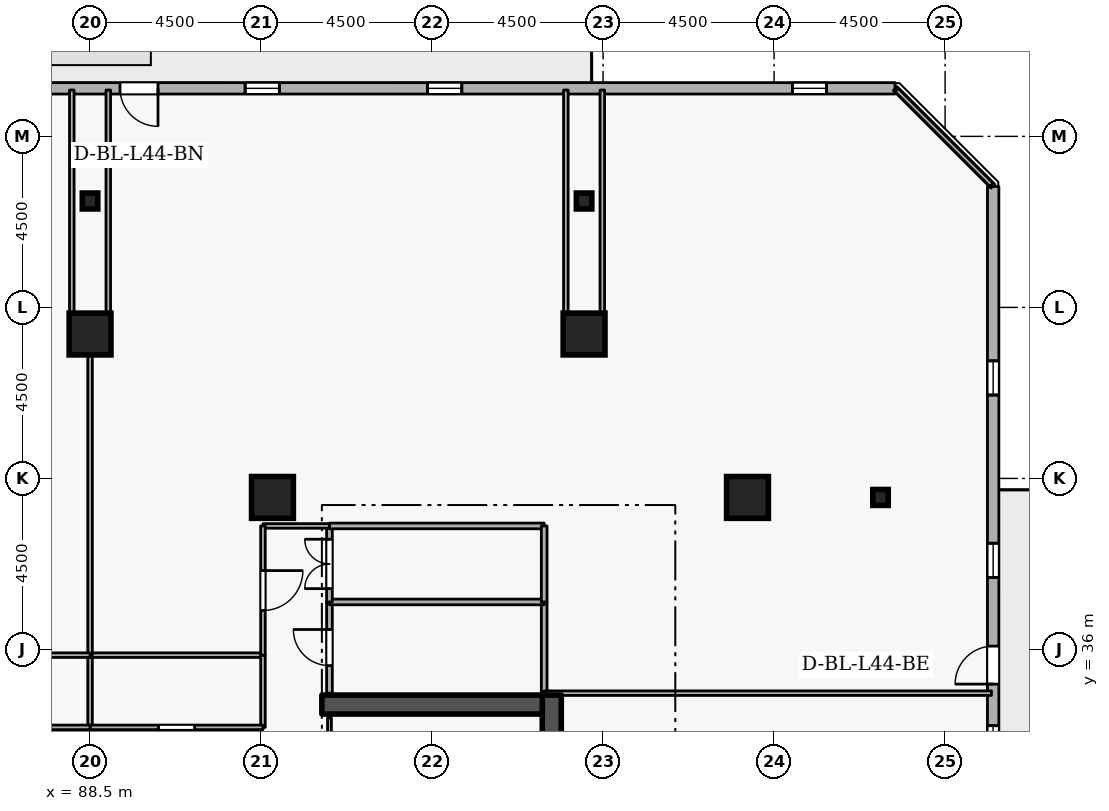
"""IFC4 building model, lengths in metres.
Left out: names, types, materials, properties, quantities, classifications, styles, units other than length and angle.
Written with IfcOpenShell. Run it as: python <this file> out.ifc"""

import sys

from ifc_helpers import new_model, si_unit, direction, frame, frame_2d, origin, origin_2d, place, context, subcontext, project, spatial, rectangle, i_section, extrude, element, fill, save


model = new_model("IFC4")
c1 = context("Model", 3, precision=1e-05, world=origin(), true_north=direction((0.0, 1.0)))
c2 = subcontext(c1, "Body", "Model", "MODEL_VIEW")
j1 = project(units=[si_unit("LENGTHUNIT", "METRE"), si_unit("PLANEANGLEUNIT", "RADIAN")], contexts=[c1])
p1 = place(None, origin())
s1 = spatial("IfcSite", under=j1, at=p1, CompositionType="ELEMENT")
p2 = place(p1, origin())
s2 = spatial("IfcBuilding", under=s1, at=p2, CompositionType="ELEMENT")
p3 = place(p2, frame((0.0, 0.0, 167.1)))
s3 = spatial("IfcBuildingStorey", under=s2, at=p3, CompositionType="ELEMENT", Elevation=167.1)
p4 = place(p3, frame((100.65, 19.2, 0.0), z_axis=(0.0, 0.0, 1.0), x_axis=(0.0, 1.0, 0.0)))
e1 = element("IfcWall", 1, at=p4, inside=s3, PredefinedType="SHEAR", context=c2, shape_type="SweptSolid", body=[
    extrude(rectangle(XDim=15.6, YDim=0.5, at=frame_2d((7.8, 0.0))), origin(), (0.0, 0.0, 1.0), 3.6),
])
p5 = place(p3, frame((94.6, 34.55, 0.0), z_axis=(0.0, 0.0, 1.0), x_axis=(1.0, 0.0, 0.0)))
e2 = element("IfcWall", 2, at=p5, inside=s3, PredefinedType="SHEAR", context=c2, shape_type="SweptSolid", body=[
    extrude(rectangle(XDim=5.8, YDim=0.5, at=frame_2d((2.9, 0.0))), origin(), (0.0, 0.0, 1.0), 3.6),
])
for number, where, z_axis, x_axis in (
    (3, (105.8, 40.0, 0.0), (0.0, 0.0, 1.0), (1.0, 0.0, 0.0)),
    (4, (101.5, 44.3, 0.0), (0.0, 0.0, 1.0), (1.0, 0.0, 0.0)),
    (5, (88.5, 44.3, 0.0), (0.0, 0.0, 1.0), (1.0, 0.0, 0.0)),
    (6, (93.3, 40.0, 0.0), (0.0, 0.0, 1.0), (1.0, 0.0, 0.0)),
):
    element("IfcColumn", number, at=place(p3, frame(where, z_axis=z_axis, x_axis=x_axis)), inside=s3, PredefinedType="COLUMN", context=c2, shape_type="SweptSolid", body=[
        extrude(rectangle(XDim=1.1, YDim=1.1, at=origin_2d()), origin(), (0.0, 0.0, 1.0), 3.6),
    ])
for number, where, z_axis, x_axis in (
    (7, (109.3, 40.0, 0.0), (0.0, 0.0, 1.0), (1.0, 0.0, 0.0)),
    (8, (101.5, 47.8, 0.0), (0.0, 0.0, 1.0), (1.0, 0.0, 0.0)),
    (9, (88.5, 47.8, 0.0), (0.0, 0.0, 1.0), (1.0, 0.0, 0.0)),
):
    element("IfcColumn", number, at=place(p3, frame(where, z_axis=z_axis, x_axis=x_axis)), inside=s3, PredefinedType="COLUMN", context=c2, shape_type="SweptSolid", body=[
        extrude(i_section(OverallWidth=0.407, OverallDepth=0.419, WebThickness=0.031, FlangeThickness=0.049, FilletRadius=0.015, at=origin_2d()), origin(), (0.0, 0.0, 1.0), 3.6),
    ])
p6 = place(p3, frame((112.264, 12.094, 0.0), z_axis=(0.0, 0.0, 1.0), x_axis=(2.7061402e-05, 0.999999999634, 0.0)))
e10 = element("IfcWall", 10, at=p6, inside=s3, PredefinedType="STANDARD", context=c2, shape_type="SweptSolid", body=[
    extrude(rectangle(XDim=36.087, YDim=0.3, at=frame_2d((18.043, 0.0))), origin(), (0.0, 0.0, 1.0), 2.7),
])
p7 = place(p6, frame((22.993, 0.0, 0.0)))
e11 = element("IfcOpeningElement", 11, at=p7, cuts=e10, PredefinedType="OPENING", context=c2, shape_type="SweptSolid", body=[
    extrude(rectangle(XDim=1.0, YDim=2.08, at=frame_2d((0.5, 1.04))), frame((0.0, 0.16, 0.0), z_axis=(0.0, -1.0, 0.0), x_axis=(1.0, 0.0, 0.0)), (0.0, 0.0, 1.0), 0.32),
])
p8 = place(p6, frame((1.8, 0.0, 0.72)))
e12 = element("IfcOpeningElement", 12, at=p8, cuts=e10, PredefinedType="OPENING", context=c2, shape_type="SweptSolid", body=[
    extrude(rectangle(XDim=0.9, YDim=1.75, at=frame_2d((0.45, 0.875))), frame((0.0, 0.16, 0.0), z_axis=(0.0, -1.0, 0.0), x_axis=(1.0, 0.0, 0.0)), (0.0, 0.0, 1.0), 0.32),
])
p9 = place(p6, frame((6.6, 0.0, 0.72)))
e13 = element("IfcOpeningElement", 13, at=p9, cuts=e10, PredefinedType="OPENING", context=c2, shape_type="SweptSolid", body=[
    extrude(rectangle(XDim=0.9, YDim=1.75, at=frame_2d((0.45, 0.875))), frame((0.0, 0.16, 0.0), z_axis=(0.0, -1.0, 0.0), x_axis=(1.0, 0.0, 0.0)), (0.0, 0.0, 1.0), 0.32),
])
p10 = place(p6, frame((11.4, 0.0, 0.72)))
e14 = element("IfcOpeningElement", 14, at=p10, cuts=e10, PredefinedType="OPENING", context=c2, shape_type="SweptSolid", body=[
    extrude(rectangle(XDim=0.9, YDim=1.75, at=frame_2d((0.45, 0.875))), frame((0.0, 0.16, 0.0), z_axis=(0.0, -1.0, 0.0), x_axis=(1.0, 0.0, 0.0)), (0.0, 0.0, 1.0), 0.32),
])
p11 = place(p6, frame((16.2, 0.0, 0.72)))
e15 = element("IfcOpeningElement", 15, at=p11, cuts=e10, PredefinedType="OPENING", context=c2, shape_type="SweptSolid", body=[
    extrude(rectangle(XDim=0.9, YDim=1.75, at=frame_2d((0.45, 0.875))), frame((0.0, 0.16, 0.0), z_axis=(0.0, -1.0, 0.0), x_axis=(1.0, 0.0, 0.0)), (0.0, 0.0, 1.0), 0.32),
])
p12 = place(p6, frame((21.0, 0.0, 0.72)))
e16 = element("IfcOpeningElement", 16, at=p12, cuts=e10, PredefinedType="OPENING", context=c2, shape_type="SweptSolid", body=[
    extrude(rectangle(XDim=0.9, YDim=1.75, at=frame_2d((0.45, 0.875))), frame((0.0, 0.16, 0.0), z_axis=(0.0, -1.0, 0.0), x_axis=(1.0, 0.0, 0.0)), (0.0, 0.0, 1.0), 0.32),
])
p13 = place(p6, frame((25.8, 0.0, 0.72)))
e17 = element("IfcOpeningElement", 17, at=p13, cuts=e10, PredefinedType="OPENING", context=c2, shape_type="SweptSolid", body=[
    extrude(rectangle(XDim=0.9, YDim=1.75, at=frame_2d((0.45, 0.875))), frame((0.0, 0.16, 0.0), z_axis=(0.0, -1.0, 0.0), x_axis=(1.0, 0.0, 0.0)), (0.0, 0.0, 1.0), 0.32),
])
p14 = place(p6, frame((30.6, 0.0, 0.72)))
e18 = element("IfcOpeningElement", 18, at=p14, cuts=e10, PredefinedType="OPENING", context=c2, shape_type="SweptSolid", body=[
    extrude(rectangle(XDim=0.9, YDim=1.75, at=frame_2d((0.45, 0.875))), frame((0.0, 0.16, 0.0), z_axis=(0.0, -1.0, 0.0), x_axis=(1.0, 0.0, 0.0)), (0.0, 0.0, 1.0), 0.32),
])
p15 = place(p3, frame((109.681, 50.765, 0.0), z_axis=(0.0, 0.0, 1.0), x_axis=(-0.999999999634, -2.7061402e-05, 0.0)))
e19 = element("IfcWall", 19, at=p15, inside=s3, PredefinedType="STANDARD", context=c2, shape_type="SweptSolid", body=[
    extrude(rectangle(XDim=36.087, YDim=0.3, at=frame_2d((18.043, 0.0))), origin(), (0.0, 0.0, 1.0), 2.7),
])
p16 = place(p15, frame((19.393, 0.0, 0.0)))
e20 = element("IfcOpeningElement", 20, at=p16, cuts=e19, PredefinedType="OPENING", context=c2, shape_type="SweptSolid", body=[
    extrude(rectangle(XDim=1.0, YDim=2.08, at=frame_2d((0.5, 1.04))), frame((0.0, 0.16, 0.0), z_axis=(0.0, -1.0, 0.0), x_axis=(1.0, 0.0, 0.0)), (0.0, 0.0, 1.0), 0.32),
])
p17 = place(p15, frame((1.8, 0.0, 0.72)))
e21 = element("IfcOpeningElement", 21, at=p17, cuts=e19, PredefinedType="OPENING", context=c2, shape_type="SweptSolid", body=[
    extrude(rectangle(XDim=0.9, YDim=1.75, at=frame_2d((0.45, 0.875))), frame((0.0, 0.16, 0.0), z_axis=(0.0, -1.0, 0.0), x_axis=(1.0, 0.0, 0.0)), (0.0, 0.0, 1.0), 0.32),
])
p18 = place(p15, frame((11.4, 0.0, 0.72)))
e22 = element("IfcOpeningElement", 22, at=p18, cuts=e19, PredefinedType="OPENING", context=c2, shape_type="SweptSolid", body=[
    extrude(rectangle(XDim=0.9, YDim=1.75, at=frame_2d((0.45, 0.875))), frame((0.0, 0.16, 0.0), z_axis=(0.0, -1.0, 0.0), x_axis=(1.0, 0.0, 0.0)), (0.0, 0.0, 1.0), 0.32),
])
p19 = place(p15, frame((16.2, 0.0, 0.72)))
e23 = element("IfcOpeningElement", 23, at=p19, cuts=e19, PredefinedType="OPENING", context=c2, shape_type="SweptSolid", body=[
    extrude(rectangle(XDim=0.9, YDim=1.75, at=frame_2d((0.45, 0.875))), frame((0.0, 0.16, 0.0), z_axis=(0.0, -1.0, 0.0), x_axis=(1.0, 0.0, 0.0)), (0.0, 0.0, 1.0), 0.32),
])
p20 = place(p15, frame((25.8, 0.0, 0.72)))
e24 = element("IfcOpeningElement", 24, at=p20, cuts=e19, PredefinedType="OPENING", context=c2, shape_type="SweptSolid", body=[
    extrude(rectangle(XDim=0.9, YDim=1.75, at=frame_2d((0.45, 0.875))), frame((0.0, 0.16, 0.0), z_axis=(0.0, -1.0, 0.0), x_axis=(1.0, 0.0, 0.0)), (0.0, 0.0, 1.0), 0.32),
])
p21 = place(p15, frame((30.6, 0.0, 0.72)))
e25 = element("IfcOpeningElement", 25, at=p21, cuts=e19, PredefinedType="OPENING", context=c2, shape_type="SweptSolid", body=[
    extrude(rectangle(XDim=0.9, YDim=1.75, at=frame_2d((0.45, 0.875))), frame((0.0, 0.16, 0.0), z_axis=(0.0, -1.0, 0.0), x_axis=(1.0, 0.0, 0.0)), (0.0, 0.0, 1.0), 0.32),
])
p22 = place(p3, frame((94.8, 32.05, 0.0), z_axis=(0.0, 0.0, 1.0), x_axis=(0.0, 1.0, 0.0)))
e26 = element("IfcWall", 26, at=p22, inside=s3, PredefinedType="PARTITIONING", context=c2, shape_type="SweptSolid", body=[
    extrude(rectangle(XDim=2.15, YDim=0.1, at=frame_2d((1.075, 0.0))), origin(), (0.0, 0.0, 1.0), 3.34),
])
p23 = place(p22, frame((0.6, 0.0, 0.0)))
e27 = element("IfcOpeningElement", 27, at=p23, cuts=e26, PredefinedType="OPENING", context=c2, shape_type="SweptSolid", body=[
    extrude(rectangle(XDim=0.95, YDim=2.1, at=frame_2d((0.475, 1.05))), frame((0.0, 0.06, 0.0), z_axis=(0.0, -1.0, 0.0), x_axis=(1.0, 0.0, 0.0)), (0.0, 0.0, 1.0), 0.12),
])
p24 = place(p3, frame((100.45, 37.25, 0.0), z_axis=(0.0, 0.0, 1.0), x_axis=(0.0, -1.0, 0.0)))
e28 = element("IfcWall", 28, at=p24, inside=s3, PredefinedType="PARTITIONING", context=c2, shape_type="SweptSolid", body=[
    extrude(rectangle(XDim=2.4, YDim=0.15, at=frame_2d((1.2, 0.0))), origin(), (0.0, 0.0, 1.0), 3.34),
])
p25 = place(p3, frame((94.8, 34.85, 0.0), z_axis=(0.0, 0.0, 1.0), x_axis=(0.0, 1.0, 0.0)))
e29 = element("IfcWall", 29, at=p25, inside=s3, PredefinedType="PARTITIONING", context=c2, shape_type="SweptSolid", body=[
    extrude(rectangle(XDim=2.4, YDim=0.15, at=frame_2d((1.2, 0.0))), origin(), (0.0, 0.0, 1.0), 3.34),
])
p26 = place(p25, frame((0.725, 0.0, 0.0)))
e30 = element("IfcOpeningElement", 30, at=p26, cuts=e29, PredefinedType="OPENING", context=c2, shape_type="SweptSolid", body=[
    extrude(rectangle(XDim=0.95, YDim=2.1, at=frame_2d((0.475, 1.05))), frame((0.0, 0.085, 0.0), z_axis=(0.0, -1.0, 0.0), x_axis=(1.0, 0.0, 0.0)), (0.0, 0.0, 1.0), 0.17),
])
p27 = place(p3, frame((94.8, 37.25, 0.0), z_axis=(0.0, 0.0, 1.0), x_axis=(1.0, 0.0, 0.0)))
e31 = element("IfcWall", 31, at=p27, inside=s3, PredefinedType="PARTITIONING", context=c2, shape_type="SweptSolid", body=[
    extrude(rectangle(XDim=5.65, YDim=0.15, at=frame_2d((2.825, 0.0))), origin(), (0.0, 0.0, 1.0), 3.34),
])
p28 = place(p3, frame((94.8, 37.25, 0.0), z_axis=(0.0, 0.0, 1.0), x_axis=(0.0, 1.0, 0.0)))
e32 = element("IfcWall", 32, at=p28, inside=s3, PredefinedType="PARTITIONING", context=c2, shape_type="SweptSolid", body=[
    extrude(rectangle(XDim=2.0, YDim=0.15, at=frame_2d((1.0, 0.0))), origin(), (0.0, 0.0, 1.0), 3.34),
])
p29 = place(p28, frame((0.35, 0.0, 0.0)))
e33 = element("IfcOpeningElement", 33, at=p29, cuts=e32, PredefinedType="OPENING", context=c2, shape_type="SweptSolid", body=[
    extrude(rectangle(XDim=1.3, YDim=2.12, at=frame_2d((0.65, 1.06))), frame((0.0, 0.085, 0.0), z_axis=(0.0, -1.0, 0.0), x_axis=(1.0, 0.0, 0.0)), (0.0, 0.0, 1.0), 0.17),
])
p30 = place(p3, frame((94.8, 39.25, 0.0), z_axis=(0.0, 0.0, 1.0), x_axis=(1.0, 0.0, 0.0)))
e34 = element("IfcWall", 34, at=p30, inside=s3, PredefinedType="PARTITIONING", context=c2, shape_type="SweptSolid", body=[
    extrude(rectangle(XDim=5.65, YDim=0.15, at=frame_2d((2.825, 0.0))), origin(), (0.0, 0.0, 1.0), 3.34),
])
p31 = place(p3, frame((100.45, 39.25, 0.0), z_axis=(0.0, 0.0, 1.0), x_axis=(0.0, -1.0, 0.0)))
e35 = element("IfcWall", 35, at=p31, inside=s3, PredefinedType="PARTITIONING", context=c2, shape_type="SweptSolid", body=[
    extrude(rectangle(XDim=2.0, YDim=0.15, at=frame_2d((1.0, 0.0))), origin(), (0.0, 0.0, 1.0), 3.34),
])
p32 = place(p3, frame((88.5, 33.95, 0.0), z_axis=(0.0, 0.0, 1.0), x_axis=(0.0, 1.0, 0.0)))
e36 = element("IfcWall", 36, at=p32, inside=s3, PredefinedType="PARTITIONING", context=c2, shape_type="SweptSolid", body=[
    extrude(rectangle(XDim=1.9, YDim=0.12, at=frame_2d((0.95, 0.0))), origin(), (0.0, 0.0, 1.0), 3.34),
])
p33 = place(p3, frame((88.5, 35.85, 0.0), z_axis=(0.0, 0.0, 1.0), x_axis=(1.0, 0.0, 0.0)))
e37 = element("IfcWall", 37, at=p33, inside=s3, PredefinedType="PARTITIONING", context=c2, shape_type="SweptSolid", body=[
    extrude(rectangle(XDim=4.55, YDim=0.12, at=frame_2d((2.275, 0.0))), origin(), (0.0, 0.0, 1.0), 3.34),
])
p34 = place(p3, frame((93.05, 35.85, 0.0), z_axis=(0.0, 0.0, 1.0), x_axis=(0.0, -1.0, 0.0)))
e38 = element("IfcWall", 38, at=p34, inside=s3, PredefinedType="PARTITIONING", context=c2, shape_type="SweptSolid", body=[
    extrude(rectangle(XDim=1.9, YDim=0.12, at=frame_2d((0.95, 0.0))), origin(), (0.0, 0.0, 1.0), 3.34),
])
p35 = place(p3, frame((93.05, 33.95, 0.0), z_axis=(0.0, 0.0, 1.0), x_axis=(-1.0, 0.0, 0.0)))
e39 = element("IfcWall", 39, at=p35, inside=s3, PredefinedType="PARTITIONING", context=c2, shape_type="SweptSolid", body=[
    extrude(rectangle(XDim=4.55, YDim=0.12, at=frame_2d((2.275, 0.0))), origin(), (0.0, 0.0, 1.0), 3.34),
])
p36 = place(p35, frame((1.8, 0.0, 0.0)))
e40 = element("IfcOpeningElement", 40, at=p36, cuts=e39, PredefinedType="OPENING", context=c2, shape_type="SweptSolid", body=[
    extrude(rectangle(XDim=0.95, YDim=2.1, at=frame_2d((0.475, 1.05))), frame((0.0, 0.07, 0.0), z_axis=(0.0, -1.0, 0.0), x_axis=(1.0, 0.0, 0.0)), (0.0, 0.0, 1.0), 0.14),
])
p37 = place(p3, frame((94.8, 39.25, 0.0), z_axis=(0.0, 0.0, 1.0), x_axis=(-1.0, 0.0, 0.0)))
e41 = element("IfcWall", 41, at=p37, inside=s3, PredefinedType="PARTITIONING", context=c2, shape_type="SweptSolid", body=[
    extrude(rectangle(XDim=1.75, YDim=0.12, at=frame_2d((0.875, 0.0))), origin(), (0.0, 0.0, 1.0), 3.34),
])
p38 = place(p3, frame((93.05, 39.25, 0.0), z_axis=(0.0, 0.0, 1.0), x_axis=(0.0, -1.0, 0.0)))
e42 = element("IfcWall", 42, at=p38, inside=s3, PredefinedType="PARTITIONING", context=c2, shape_type="SweptSolid", body=[
    extrude(rectangle(XDim=3.4, YDim=0.12, at=frame_2d((1.7, 0.0))), origin(), (0.0, 0.0, 1.0), 3.34),
])
p39 = place(p38, frame((1.175, 0.0, 0.0)))
e43 = element("IfcOpeningElement", 43, at=p39, cuts=e42, PredefinedType="OPENING", context=c2, shape_type="SweptSolid", body=[
    extrude(rectangle(XDim=1.05, YDim=2.1, at=frame_2d((0.525, 1.05))), frame((0.0, 0.07, 0.0), z_axis=(0.0, -1.0, 0.0), x_axis=(1.0, 0.0, 0.0)), (0.0, 0.0, 1.0), 0.14),
])
p40 = place(p3, frame((88.5, 35.85, 0.0), z_axis=(0.0, 0.0, 1.0), x_axis=(0.0, 1.0, 0.0)))
e44 = element("IfcWall", 44, at=p40, inside=s3, PredefinedType="PARTITIONING", context=c2, shape_type="SweptSolid", body=[
    extrude(rectangle(XDim=8.45, YDim=0.12, at=frame_2d((4.225, 0.0))), origin(), (0.0, 0.0, 1.0), 2.882),
])
for number, where, z_axis, x_axis in (
    (45, (88.98, 44.3, 0.0), (0.0, 0.0, 1.0), (0.0, 1.0, 0.0)),
    (46, (101.02, 50.72, 0.0), (0.0, 0.0, 1.0), (0.0, -1.0, 0.0)),
    (47, (101.98, 44.3, 0.0), (0.0, 0.0, 1.0), (0.0, 1.0, 0.0)),
):
    element("IfcWall", number, at=place(p3, frame(where, z_axis=z_axis, x_axis=x_axis)), inside=s3, PredefinedType="PARTITIONING", context=c2, shape_type="SweptSolid", body=[
        extrude(rectangle(XDim=6.42, YDim=0.12, at=frame_2d((3.21, 0.0))), origin(), (0.0, 0.0, 1.0), 3.34),
    ])
p41 = place(p3, frame((109.725, 50.72, 0.0), z_axis=(0.0, 0.0, 1.0), x_axis=(0.707106781187, -0.707106781187, 0.0)))
e48 = element("IfcWall", 48, at=p41, inside=s3, PredefinedType="PARTITIONING", context=c2, shape_type="SweptSolid", body=[
    extrude(rectangle(XDim=3.528, YDim=0.12, at=frame_2d((1.764, 0.0))), origin(), (0.0, 0.0, 1.0), 3.34),
])
p42 = place(p3, frame((112.22, 34.85, 0.0), z_axis=(0.0, 0.0, 1.0), x_axis=(-1.0, 0.0, 0.0)))
e49 = element("IfcWall", 49, at=p42, inside=s3, PredefinedType="PARTITIONING", context=c2, shape_type="SweptSolid", body=[
    extrude(rectangle(XDim=11.77, YDim=0.12, at=frame_2d((5.885, 0.0))), origin(), (0.0, 0.0, 1.0), 2.545),
])
p43 = place(p3, frame((83.95, 35.85, 0.0), z_axis=(0.0, 0.0, 1.0), x_axis=(1.0, 0.0, 0.0)))
e50 = element("IfcWall", 50, at=p43, inside=s3, PredefinedType="PARTITIONING", context=c2, shape_type="SweptSolid", body=[
    extrude(rectangle(XDim=4.55, YDim=0.12, at=frame_2d((2.275, 0.0))), origin(), (0.0, 0.0, 1.0), 3.34),
])
p44 = place(p3, frame((88.5, 33.95, 0.0), z_axis=(0.0, 0.0, 1.0), x_axis=(-1.0, 0.0, 0.0)))
e51 = element("IfcWall", 51, at=p44, inside=s3, PredefinedType="PARTITIONING", context=c2, shape_type="SweptSolid", body=[
    extrude(rectangle(XDim=4.55, YDim=0.12, at=frame_2d((2.275, 0.0))), origin(), (0.0, 0.0, 1.0), 3.34),
])
p45 = place(p44, frame((1.8, 0.0, 0.0)))
e52 = element("IfcOpeningElement", 52, at=p45, cuts=e51, PredefinedType="OPENING", context=c2, shape_type="SweptSolid", body=[
    extrude(rectangle(XDim=0.95, YDim=2.1, at=frame_2d((0.475, 1.05))), frame((0.0, 0.07, 0.0), z_axis=(0.0, -1.0, 0.0), x_axis=(1.0, 0.0, 0.0)), (0.0, 0.0, 1.0), 0.14),
])
p46 = place(p3, frame((88.02, 50.72, 0.0), z_axis=(0.0, 0.0, 1.0), x_axis=(0.0, -1.0, 0.0)))
e53 = element("IfcWall", 53, at=p46, inside=s3, PredefinedType="PARTITIONING", context=c2, shape_type="SweptSolid", body=[
    extrude(rectangle(XDim=6.42, YDim=0.12, at=frame_2d((3.21, 0.0))), origin(), (0.0, 0.0, 1.0), 3.34),
])
p47 = place(p7, origin())
e54 = element("IfcDoor", 54, at=p47, inside=s3, OperationType="SINGLE_SWING_LEFT", PredefinedType="DOOR", context=c2, shape_type="SweptSolid", body=[
    extrude(rectangle(XDim=1.0, YDim=2.08, at=frame_2d((0.5, 1.04))), frame((0.0, 0.025, 0.0), z_axis=(0.0, -1.0, 0.0), x_axis=(1.0, 0.0, 0.0)), (0.0, 0.0, 1.0), 0.05),
])
fill(e11, e54)
p48 = place(p12, origin())
e55 = element("IfcWindow", 55, at=p48, inside=s3, PartitioningType="SINGLE_PANEL", PredefinedType="WINDOW", context=c2, shape_type="SweptSolid", body=[
    extrude(rectangle(XDim=0.9, YDim=1.75, at=frame_2d((0.45, 0.875))), frame((0.0, 0.03, 0.0), z_axis=(0.0, -1.0, 0.0), x_axis=(1.0, 0.0, 0.0)), (0.0, 0.0, 1.0), 0.06),
])
fill(e16, e55)
p49 = place(p13, origin())
e56 = element("IfcWindow", 56, at=p49, inside=s3, PartitioningType="SINGLE_PANEL", PredefinedType="WINDOW", context=c2, shape_type="SweptSolid", body=[
    extrude(rectangle(XDim=0.9, YDim=1.75, at=frame_2d((0.45, 0.875))), frame((0.0, 0.03, 0.0), z_axis=(0.0, -1.0, 0.0), x_axis=(1.0, 0.0, 0.0)), (0.0, 0.0, 1.0), 0.06),
])
fill(e17, e56)
p50 = place(p14, origin())
e57 = element("IfcWindow", 57, at=p50, inside=s3, PartitioningType="SINGLE_PANEL", PredefinedType="WINDOW", context=c2, shape_type="SweptSolid", body=[
    extrude(rectangle(XDim=0.9, YDim=1.75, at=frame_2d((0.45, 0.875))), frame((0.0, 0.03, 0.0), z_axis=(0.0, -1.0, 0.0), x_axis=(1.0, 0.0, 0.0)), (0.0, 0.0, 1.0), 0.06),
])
fill(e18, e57)
p51 = place(p16, origin())
e58 = element("IfcDoor", 58, at=p51, inside=s3, OperationType="SINGLE_SWING_LEFT", PredefinedType="DOOR", context=c2, shape_type="SweptSolid", body=[
    extrude(rectangle(XDim=1.0, YDim=2.08, at=frame_2d((0.5, 1.04))), frame((0.0, 0.025, 0.0), z_axis=(0.0, -1.0, 0.0), x_axis=(1.0, 0.0, 0.0)), (0.0, 0.0, 1.0), 0.05),
])
fill(e20, e58)
p52 = place(p17, origin())
e59 = element("IfcWindow", 59, at=p52, inside=s3, PartitioningType="SINGLE_PANEL", PredefinedType="WINDOW", context=c2, shape_type="SweptSolid", body=[
    extrude(rectangle(XDim=0.9, YDim=1.75, at=frame_2d((0.45, 0.875))), frame((0.0, 0.03, 0.0), z_axis=(0.0, -1.0, 0.0), x_axis=(1.0, 0.0, 0.0)), (0.0, 0.0, 1.0), 0.06),
])
fill(e21, e59)
p53 = place(p18, origin())
e60 = element("IfcWindow", 60, at=p53, inside=s3, PartitioningType="SINGLE_PANEL", PredefinedType="WINDOW", context=c2, shape_type="SweptSolid", body=[
    extrude(rectangle(XDim=0.9, YDim=1.75, at=frame_2d((0.45, 0.875))), frame((0.0, 0.03, 0.0), z_axis=(0.0, -1.0, 0.0), x_axis=(1.0, 0.0, 0.0)), (0.0, 0.0, 1.0), 0.06),
])
fill(e22, e60)
p54 = place(p19, origin())
e61 = element("IfcWindow", 61, at=p54, inside=s3, PartitioningType="SINGLE_PANEL", PredefinedType="WINDOW", context=c2, shape_type="SweptSolid", body=[
    extrude(rectangle(XDim=0.9, YDim=1.75, at=frame_2d((0.45, 0.875))), frame((0.0, 0.03, 0.0), z_axis=(0.0, -1.0, 0.0), x_axis=(1.0, 0.0, 0.0)), (0.0, 0.0, 1.0), 0.06),
])
fill(e23, e61)
p55 = place(p26, origin())
e62 = element("IfcDoor", 62, at=p55, inside=s3, OperationType="SINGLE_SWING_RIGHT", PredefinedType="DOOR", context=c2, shape_type="SweptSolid", body=[
    extrude(rectangle(XDim=0.95, YDim=2.1, at=frame_2d((0.475, 1.05))), frame((0.0, 0.025, 0.0), z_axis=(0.0, -1.0, 0.0), x_axis=(1.0, 0.0, 0.0)), (0.0, 0.0, 1.0), 0.05),
])
fill(e30, e62)
p56 = place(p29, origin())
e63 = element("IfcDoor", 63, at=p56, inside=s3, OperationType="DOUBLE_DOOR_SINGLE_SWING", PredefinedType="DOOR", context=c2, shape_type="SweptSolid", body=[
    extrude(rectangle(XDim=1.3, YDim=2.12, at=frame_2d((0.65, 1.06))), frame((0.0, 0.025, 0.0), z_axis=(0.0, -1.0, 0.0), x_axis=(1.0, 0.0, 0.0)), (0.0, 0.0, 1.0), 0.05),
])
fill(e33, e63)
p57 = place(p36, origin())
e64 = element("IfcDoor", 64, at=p57, inside=s3, OperationType="SINGLE_SWING_RIGHT", PredefinedType="DOOR", context=c2, shape_type="SweptSolid", body=[
    extrude(rectangle(XDim=0.95, YDim=2.1, at=frame_2d((0.475, 1.05))), frame((0.0, 0.025, 0.0), z_axis=(0.0, -1.0, 0.0), x_axis=(1.0, 0.0, 0.0)), (0.0, 0.0, 1.0), 0.05),
])
fill(e40, e64)
p58 = place(p39, origin())
e65 = element("IfcDoor", 65, at=p58, inside=s3, OperationType="SINGLE_SWING_LEFT", PredefinedType="DOOR", context=c2, shape_type="SweptSolid", body=[
    extrude(rectangle(XDim=1.05, YDim=2.1, at=frame_2d((0.525, 1.05))), frame((0.0, 0.025, 0.0), z_axis=(0.0, -1.0, 0.0), x_axis=(1.0, 0.0, 0.0)), (0.0, 0.0, 1.0), 0.05),
])
fill(e43, e65)
save(model, sys.argv[1])
